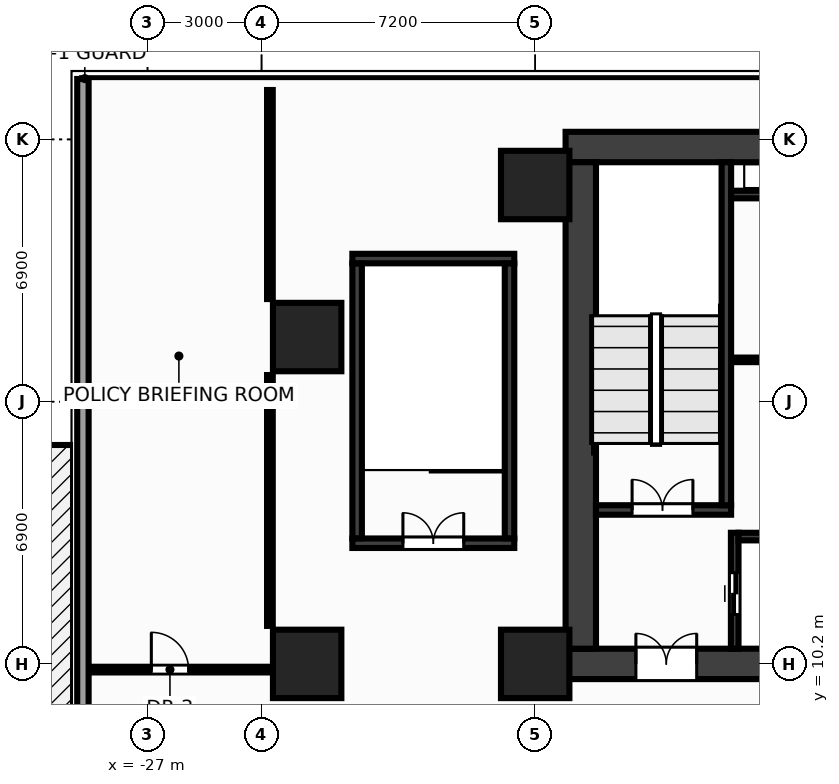
"""IFC4 building model, lengths in metres.
Left out: names, types, materials, properties, quantities, classifications, styles, units other than length and angle.
Written with IfcOpenShell. Run it as: python <this file> out.ifc"""

import sys

from ifc_helpers import new_model, si_unit, direction, frame, frame_2d, origin, origin_2d, place, context, subcontext, project, spatial, rectangle, extrude, source, transform, mapped, element, fill, save


model = new_model("IFC4")
c1 = context("Model", 3, precision=1e-05, world=origin(), true_north=direction((0.0, 1.0)))
c2 = subcontext(c1, "Body", "Model", "MODEL_VIEW")
j1 = project(units=[si_unit("LENGTHUNIT", "METRE"), si_unit("PLANEANGLEUNIT", "RADIAN")], contexts=[c1])
p1 = place(None, origin())
s1 = spatial("IfcSite", under=j1, at=p1, CompositionType="ELEMENT")
p2 = place(p1, origin())
s2 = spatial("IfcBuilding", under=s1, at=p2, CompositionType="ELEMENT")
p3 = place(p2, frame((0.0, 0.0, 18.95)))
s3 = spatial("IfcBuildingStorey", under=s2, at=p3, CompositionType="ELEMENT", Elevation=18.95)
m1 = source(origin(), c2, "Body", "SweptSolid", [
    extrude(rectangle(XDim=32.0, YDim=0.8, at=frame_2d((16.0, 0.0))), origin(), (0.0, 0.0, 1.0), 4.65),
])
p4 = place(p3, frame((-16.0, 23.8, 0.0), z_axis=(0.0, 0.0, 1.0), x_axis=(1.0, 0.0, 0.0)))
e1 = element("IfcWall", 1, at=p4, inside=s3, PredefinedType="SHEAR", context=c2, shape_type="MappedRepresentation", body=[
    mapped(m1, transform((0.0, 0.0, 0.0), x_axis=(1.0, 0.0, 0.0), y_axis=(0.0, 1.0, 0.0), z_axis=(0.0, 0.0, 1.0), scale=1.0)),
])
p5 = place(p3, frame((-16.0, 10.2, 0.0), z_axis=(0.0, 0.0, 1.0), x_axis=(1.0, 0.0, 0.0)))
e2 = element("IfcWall", 2, at=p5, inside=s3, PredefinedType="SHEAR", context=c2, shape_type="MappedRepresentation", body=[
    mapped(m1, transform((0.0, 0.0, 0.0), x_axis=(1.0, 0.0, 0.0), y_axis=(0.0, 1.0, 0.0), z_axis=(0.0, 0.0, 1.0), scale=1.0)),
])
p6 = place(p5, frame((1.85, 0.0, 0.0)))
e3 = element("IfcOpeningElement", 3, at=p6, cuts=e2, PredefinedType="OPENING", context=c2, shape_type="SweptSolid", body=[
    extrude(rectangle(XDim=1.6, YDim=2.15, at=frame_2d((0.8, 1.075))), frame((0.0, 0.412, 0.0), z_axis=(0.0, -1.0, 0.0), x_axis=(1.0, 0.0, 0.0)), (0.0, 0.0, 1.0), 0.824),
])
p7 = place(p5, frame((28.55, 0.0, 0.0)))
e4 = element("IfcOpeningElement", 4, at=p7, cuts=e2, PredefinedType="OPENING", context=c2, shape_type="SweptSolid", body=[
    extrude(rectangle(XDim=1.6, YDim=2.15, at=frame_2d((0.8, 1.075))), frame((0.0, 0.412, 0.0), z_axis=(0.0, -1.0, 0.0), x_axis=(1.0, 0.0, 0.0)), (0.0, 0.0, 1.0), 0.824),
])
p8 = place(p5, frame((15.25, 0.0, 0.0)))
e5 = element("IfcOpeningElement", 5, at=p8, cuts=e2, PredefinedType="OPENING", context=c2, shape_type="SweptSolid", body=[
    extrude(rectangle(XDim=1.5, YDim=2.2, at=frame_2d((0.75, 1.1))), frame((0.0, 0.412, 0.0), z_axis=(0.0, -1.0, 0.0), x_axis=(1.0, 0.0, 0.0)), (0.0, 0.0, 1.0), 0.824),
])
m2 = source(origin(), c2, "Body", "SweptSolid", [
    extrude(rectangle(XDim=12.8, YDim=0.8, at=frame_2d((6.4, 0.0))), origin(), (0.0, 0.0, 1.0), 4.65),
])
p9 = place(p3, frame((-15.6, 10.6, 0.0), z_axis=(0.0, 0.0, 1.0), x_axis=(0.0, 1.0, 0.0)))
e6 = element("IfcWall", 6, at=p9, inside=s3, PredefinedType="SHEAR", context=c2, shape_type="MappedRepresentation", body=[
    mapped(m2, transform((0.0, 0.0, 0.0), x_axis=(1.0, 0.0, 0.0), y_axis=(0.0, 1.0, 0.0), z_axis=(0.0, 0.0, 1.0), scale=1.0)),
])
m3 = source(origin(), c2, "Body", "SweptSolid", [
    extrude(rectangle(XDim=3.555, YDim=0.25, at=frame_2d((1.777, 0.0))), origin(), (0.0, 0.0, 1.0), 4.65),
])
p10 = place(p3, frame((-15.2, 14.25, 0.0), z_axis=(0.0, 0.0, 1.0), x_axis=(1.0, 0.0, 0.0)))
e7 = element("IfcWall", 7, at=p10, inside=s3, PredefinedType="SHEAR", context=c2, shape_type="MappedRepresentation", body=[
    mapped(m3, transform((0.0, 0.0, 0.0), x_axis=(1.0, 0.0, 0.0), y_axis=(0.0, 1.0, 0.0), z_axis=(0.0, 0.0, 1.0), scale=1.0)),
])
p11 = place(p10, frame((0.95, 0.0, 0.0)))
e8 = element("IfcOpeningElement", 8, at=p11, cuts=e7, PredefinedType="OPENING", context=c2, shape_type="SweptSolid", body=[
    extrude(rectangle(XDim=1.6, YDim=2.15, at=frame_2d((0.8, 1.075))), frame((0.0, 0.137, 0.0), z_axis=(0.0, -1.0, 0.0), x_axis=(1.0, 0.0, 0.0)), (0.0, 0.0, 1.0), 0.274),
])
m4 = source(origin(), c2, "Body", "SweptSolid", [
    extrude(rectangle(XDim=9.025, YDim=0.25, at=frame_2d((4.512, 0.0))), origin(), (0.0, 0.0, 1.0), 4.65),
])
p12 = place(p3, frame((-11.77, 14.375, 0.0), z_axis=(0.0, 0.0, 1.0), x_axis=(0.0, 1.0, 0.0)))
e9 = element("IfcWall", 9, at=p12, inside=s3, PredefinedType="SHEAR", context=c2, shape_type="MappedRepresentation", body=[
    mapped(m4, transform((0.0, 0.0, 0.0), x_axis=(1.0, 0.0, 0.0), y_axis=(0.0, 1.0, 0.0), z_axis=(0.0, 0.0, 1.0), scale=1.0)),
])
m5 = source(origin(), c2, "Body", "SweptSolid", [
    extrude(rectangle(XDim=3.05, YDim=0.2, at=frame_2d((1.525, 0.0))), origin(), (0.0, 0.0, 1.0), 4.65),
])
p13 = place(p3, frame((-11.55, 10.6, 0.0), z_axis=(0.0, 0.0, 1.0), x_axis=(0.0, 1.0, 0.0)))
e10 = element("IfcWall", 10, at=p13, inside=s3, PredefinedType="SHEAR", context=c2, shape_type="MappedRepresentation", body=[
    mapped(m5, transform((0.0, 0.0, 0.0), x_axis=(1.0, 0.0, 0.0), y_axis=(0.0, 1.0, 0.0), z_axis=(0.0, 0.0, 1.0), scale=1.0)),
])
p14 = place(p13, frame((0.9, 0.0, 0.0)))
e11 = element("IfcOpeningElement", 11, at=p14, cuts=e10, PredefinedType="OPENING", context=c2, shape_type="SweptSolid", body=[
    extrude(rectangle(XDim=1.1, YDim=2.15, at=frame_2d((0.55, 1.075))), frame((0.0, 0.112, 0.0), z_axis=(0.0, -1.0, 0.0), x_axis=(1.0, 0.0, 0.0)), (0.0, 0.0, 1.0), 0.224),
])
m6 = source(origin(), c2, "Body", "SweptSolid", [
    extrude(rectangle(XDim=2.825, YDim=0.2, at=frame_2d((1.413, 0.0))), origin(), (0.0, 0.0, 1.0), 4.65),
])
p15 = place(p3, frame((-11.45, 13.55, 0.0), z_axis=(0.0, 0.0, 1.0), x_axis=(1.0, 0.0, 0.0)))
e12 = element("IfcWall", 12, at=p15, inside=s3, PredefinedType="SHEAR", context=c2, shape_type="MappedRepresentation", body=[
    mapped(m6, transform((0.0, 0.0, 0.0), x_axis=(1.0, 0.0, 0.0), y_axis=(0.0, 1.0, 0.0), z_axis=(0.0, 0.0, 1.0), scale=1.0)),
])
m7 = source(origin(), c2, "Body", "SweptSolid", [
    extrude(rectangle(XDim=3.02, YDim=0.2, at=frame_2d((1.51, 0.0))), origin(), (0.0, 0.0, 1.0), 4.65),
])
p16 = place(p3, frame((-11.645, 22.55, 0.0), z_axis=(0.0, 0.0, 1.0), x_axis=(1.0, 0.0, 0.0)))
e13 = element("IfcWall", 13, at=p16, inside=s3, PredefinedType="SHEAR", context=c2, shape_type="MappedRepresentation", body=[
    mapped(m7, transform((0.0, 0.0, 0.0), x_axis=(1.0, 0.0, 0.0), y_axis=(0.0, 1.0, 0.0), z_axis=(0.0, 0.0, 1.0), scale=1.0)),
])
m8 = source(origin(), c2, "Body", "SweptSolid", [
    extrude(rectangle(XDim=4.26, YDim=0.25, at=frame_2d((2.13, 0.0))), origin(), (0.0, 0.0, 1.0), 4.65),
])
p17 = place(p3, frame((-21.61, 20.865, 0.0), z_axis=(0.0, 0.0, 1.0), x_axis=(1.0, 0.0, 0.0)))
e14 = element("IfcWall", 14, at=p17, inside=s3, PredefinedType="SHEAR", context=c2, shape_type="MappedRepresentation", body=[
    mapped(m8, transform((0.0, 0.0, 0.0), x_axis=(1.0, 0.0, 0.0), y_axis=(0.0, 1.0, 0.0), z_axis=(0.0, 0.0, 1.0), scale=1.0)),
])
p18 = place(p3, frame((-21.61, 13.375, 0.0), z_axis=(0.0, 0.0, 1.0), x_axis=(1.0, 0.0, 0.0)))
e15 = element("IfcWall", 15, at=p18, inside=s3, PredefinedType="SHEAR", context=c2, shape_type="MappedRepresentation", body=[
    mapped(m8, transform((0.0, 0.0, 0.0), x_axis=(1.0, 0.0, 0.0), y_axis=(0.0, 1.0, 0.0), z_axis=(0.0, 0.0, 1.0), scale=1.0)),
])
p19 = place(p18, frame((1.33, 0.0, 0.0)))
e16 = element("IfcOpeningElement", 16, at=p19, cuts=e15, PredefinedType="OPENING", context=c2, shape_type="SweptSolid", body=[
    extrude(rectangle(XDim=1.6, YDim=2.15, at=frame_2d((0.8, 1.075))), frame((0.0, 0.137, 0.0), z_axis=(0.0, -1.0, 0.0), x_axis=(1.0, 0.0, 0.0)), (0.0, 0.0, 1.0), 0.274),
])
m9 = source(origin(), c2, "Body", "SweptSolid", [
    extrude(rectangle(XDim=7.23, YDim=0.25, at=frame_2d((3.615, 0.0))), origin(), (0.0, 0.0, 1.0), 4.65),
])
for number, where, z_axis, x_axis in (
    (17, (-21.485, 13.505, 0.0), (0.0, 0.0, 1.0), (0.0, 1.0, 0.0)),
    (18, (-17.475, 13.505, 0.0), (0.0, 0.0, 1.0), (0.0, 1.0, 0.0)),
):
    element("IfcWall", number, at=place(p3, frame(where, z_axis=z_axis, x_axis=x_axis)), inside=s3, PredefinedType="SHEAR", context=c2, shape_type="MappedRepresentation", body=[
        mapped(m9, transform((0.0, 0.0, 0.0), x_axis=(1.0, 0.0, 0.0), y_axis=(0.0, 1.0, 0.0), z_axis=(0.0, 0.0, 1.0), scale=1.0)),
    ])
m10 = source(origin(), c2, "Body", "SweptSolid", [
    extrude(rectangle(XDim=1.8, YDim=1.8, at=origin_2d()), origin(), (0.0, 0.0, 1.0), 4.65),
])
for number, where, z_axis, x_axis in (
    (19, (-16.8, 10.2, 0.0), (0.0, 0.0, 1.0), (1.0, 0.0, 0.0)),
    (20, (-16.8, 22.8, 0.0), (0.0, 0.0, 1.0), (1.0, 0.0, 0.0)),
    (21, (-22.8, 10.2, 0.0), (0.0, 0.0, 1.0), (1.0, 0.0, 0.0)),
    (22, (-22.8, 18.8, 0.0), (0.0, 0.0, 1.0), (1.0, 0.0, 0.0)),
):
    element("IfcColumn", number, at=place(p3, frame(where, z_axis=z_axis, x_axis=x_axis)), inside=s3, PredefinedType="COLUMN", context=c2, shape_type="MappedRepresentation", body=[
        mapped(m10, transform((0.0, 0.0, 0.0), x_axis=(1.0, 0.0, 0.0), y_axis=(0.0, 1.0, 0.0), z_axis=(0.0, 0.0, 1.0), scale=1.0)),
    ])
m11 = source(origin(), c2, "Body", "SweptSolid", [
    extrude(rectangle(XDim=52.29, YDim=0.3, at=frame_2d((26.145, 0.0))), origin(), (0.0, 0.0, 1.0), 3.91),
])
p20 = place(p3, frame((-28.7, -26.7, 0.0), z_axis=(0.0, 0.0, 1.0), x_axis=(0.0, 1.0, 0.0)))
e23 = element("IfcWall", 23, at=p20, inside=s3, PredefinedType="STANDARD", context=c2, shape_type="MappedRepresentation", body=[
    mapped(m11, transform((0.0, 0.0, 0.0), x_axis=(1.0, 0.0, 0.0), y_axis=(0.0, 1.0, 0.0), z_axis=(0.0, 0.0, 1.0), scale=1.0)),
])
p21 = place(p20, frame((21.85, 0.0, 0.0)))
e24 = element("IfcOpeningElement", 24, at=p21, cuts=e23, PredefinedType="OPENING", context=c2, shape_type="SweptSolid", body=[
    extrude(rectangle(XDim=1.8, YDim=2.2, at=frame_2d((0.9, 1.1))), frame((0.0, 0.162, 0.0), z_axis=(0.0, -1.0, 0.0), x_axis=(1.0, 0.0, 0.0)), (0.0, 0.0, 1.0), 0.324),
])
m12 = source(origin(), c2, "Body", "SweptSolid", [
    extrude(rectangle(XDim=3.01, YDim=0.12, at=frame_2d((1.505, 0.0))), origin(), (0.0, 0.0, 1.0), 4.41),
])
p22 = place(p3, frame((-11.64, 18.2, 0.0), z_axis=(0.0, 0.0, 1.0), x_axis=(1.0, 0.0, 0.0)))
e25 = element("IfcWall", 25, at=p22, inside=s3, PredefinedType="PARTITIONING", context=c2, shape_type="MappedRepresentation", body=[
    mapped(m12, transform((0.0, 0.0, 0.0), x_axis=(1.0, 0.0, 0.0), y_axis=(0.0, 1.0, 0.0), z_axis=(0.0, 0.0, 1.0), scale=1.0)),
])
m13 = source(origin(), c2, "Body", "SweptSolid", [
    extrude(rectangle(XDim=4.7, YDim=0.15, at=frame_2d((2.35, 0.0))), origin(), (0.0, 0.0, 1.0), 3.485),
])
p23 = place(p3, frame((-28.5, 10.05, 0.0), z_axis=(0.0, 0.0, 1.0), x_axis=(1.0, 0.0, 0.0)))
e26 = element("IfcWall", 26, at=p23, inside=s3, PredefinedType="PARTITIONING", context=c2, shape_type="MappedRepresentation", body=[
    mapped(m13, transform((0.0, 0.0, 0.0), x_axis=(1.0, 0.0, 0.0), y_axis=(0.0, 1.0, 0.0), z_axis=(0.0, 0.0, 1.0), scale=1.0)),
])
p24 = place(p23, frame((1.6, 0.0, 0.0)))
e27 = element("IfcOpeningElement", 27, at=p24, cuts=e26, PredefinedType="OPENING", context=c2, shape_type="SweptSolid", body=[
    extrude(rectangle(XDim=0.98, YDim=2.15, at=frame_2d((0.49, 1.075))), frame((0.0, 0.087, 0.0), z_axis=(0.0, -1.0, 0.0), x_axis=(1.0, 0.0, 0.0)), (0.0, 0.0, 1.0), 0.174),
])
m14 = source(origin(), c2, "Body", "SweptSolid", [
    extrude(rectangle(XDim=6.6, YDim=0.15, at=frame_2d((3.3, 0.0))), origin(), (0.0, 0.0, 1.0), 4.41),
])
p25 = place(p3, frame((-23.78, 11.2, 0.0), z_axis=(0.0, 0.0, 1.0), x_axis=(0.0, 1.0, 0.0)))
e28 = element("IfcWall", 28, at=p25, inside=s3, PredefinedType="PARTITIONING", context=c2, shape_type="MappedRepresentation", body=[
    mapped(m14, transform((0.0, 0.0, 0.0), x_axis=(1.0, 0.0, 0.0), y_axis=(0.0, 1.0, 0.0), z_axis=(0.0, 0.0, 1.0), scale=1.0)),
])
m15 = source(origin(), c2, "Body", "SweptSolid", [
    extrude(rectangle(XDim=5.5, YDim=0.15, at=frame_2d((2.75, 0.0))), origin(), (0.0, 0.0, 1.0), 4.41),
])
p26 = place(p3, frame((-23.78, 19.8, 0.0), z_axis=(0.0, 0.0, 1.0), x_axis=(0.0, 1.0, 0.0)))
e29 = element("IfcWall", 29, at=p26, inside=s3, PredefinedType="PARTITIONING", context=c2, shape_type="MappedRepresentation", body=[
    mapped(m15, transform((0.0, 0.0, 0.0), x_axis=(1.0, 0.0, 0.0), y_axis=(0.0, 1.0, 0.0), z_axis=(0.0, 0.0, 1.0), scale=1.0)),
])
m16 = source(origin(), c2, "Body", "SweptSolid", [
    extrude(rectangle(XDim=1.6, YDim=2.15, at=frame_2d((0.8, 1.075))), frame((0.0, 0.025, 0.0), z_axis=(0.0, -1.0, 0.0), x_axis=(1.0, 0.0, 0.0)), (0.0, 0.0, 1.0), 0.05),
])
p27 = place(p11, origin())
e30 = element("IfcDoor", 30, at=p27, inside=s3, OperationType="DOUBLE_DOOR_SINGLE_SWING", PredefinedType="DOOR", context=c2, shape_type="MappedRepresentation", body=[
    mapped(m16, transform((0.0, 0.0, 0.0), x_axis=(1.0, 0.0, 0.0), y_axis=(0.0, 1.0, 0.0), z_axis=(0.0, 0.0, 1.0), scale=1.0)),
])
fill(e8, e30)
p28 = place(p6, origin())
e31 = element("IfcDoor", 31, at=p28, inside=s3, OperationType="DOUBLE_DOOR_SINGLE_SWING", PredefinedType="DOOR", context=c2, shape_type="MappedRepresentation", body=[
    mapped(m16, transform((0.0, 0.0, 0.0), x_axis=(1.0, 0.0, 0.0), y_axis=(0.0, 1.0, 0.0), z_axis=(0.0, 0.0, 1.0), scale=1.0)),
])
fill(e3, e31)
m17 = source(origin(), c2, "Body", "SweptSolid", [
    extrude(rectangle(XDim=1.1, YDim=2.15, at=frame_2d((0.55, 1.075))), frame((0.0, 0.025, 0.0), z_axis=(0.0, -1.0, 0.0), x_axis=(1.0, 0.0, 0.0)), (0.0, 0.0, 1.0), 0.05),
])
p29 = place(p14, origin())
e32 = element("IfcDoor", 32, at=p29, inside=s3, OperationType="DOUBLE_DOOR_SLIDING", PredefinedType="DOOR", context=c2, shape_type="MappedRepresentation", body=[
    mapped(m17, transform((0.0, 0.0, 0.0), x_axis=(1.0, 0.0, 0.0), y_axis=(0.0, 1.0, 0.0), z_axis=(0.0, 0.0, 1.0), scale=1.0)),
])
fill(e11, e32)
p30 = place(p19, origin())
e33 = element("IfcDoor", 33, at=p30, inside=s3, OperationType="DOUBLE_DOOR_SINGLE_SWING", PredefinedType="DOOR", context=c2, shape_type="MappedRepresentation", body=[
    mapped(m16, transform((0.0, 0.0, 0.0), x_axis=(1.0, 0.0, 0.0), y_axis=(0.0, 1.0, 0.0), z_axis=(0.0, 0.0, 1.0), scale=1.0)),
])
fill(e16, e33)
m18 = source(origin(), c2, "Body", "SweptSolid", [
    extrude(rectangle(XDim=0.98, YDim=2.15, at=frame_2d((0.49, 1.075))), frame((0.0, 0.025, 0.0), z_axis=(0.0, -1.0, 0.0), x_axis=(1.0, 0.0, 0.0)), (0.0, 0.0, 1.0), 0.05),
])
p31 = place(p24, origin())
e34 = element("IfcDoor", 34, at=p31, inside=s3, OperationType="SINGLE_SWING_LEFT", PredefinedType="DOOR", context=c2, shape_type="MappedRepresentation", body=[
    mapped(m18, transform((0.0, 0.0, 0.0), x_axis=(1.0, 0.0, 0.0), y_axis=(0.0, 1.0, 0.0), z_axis=(0.0, 0.0, 1.0), scale=1.0)),
])
fill(e27, e34)
save(model, sys.argv[1])
